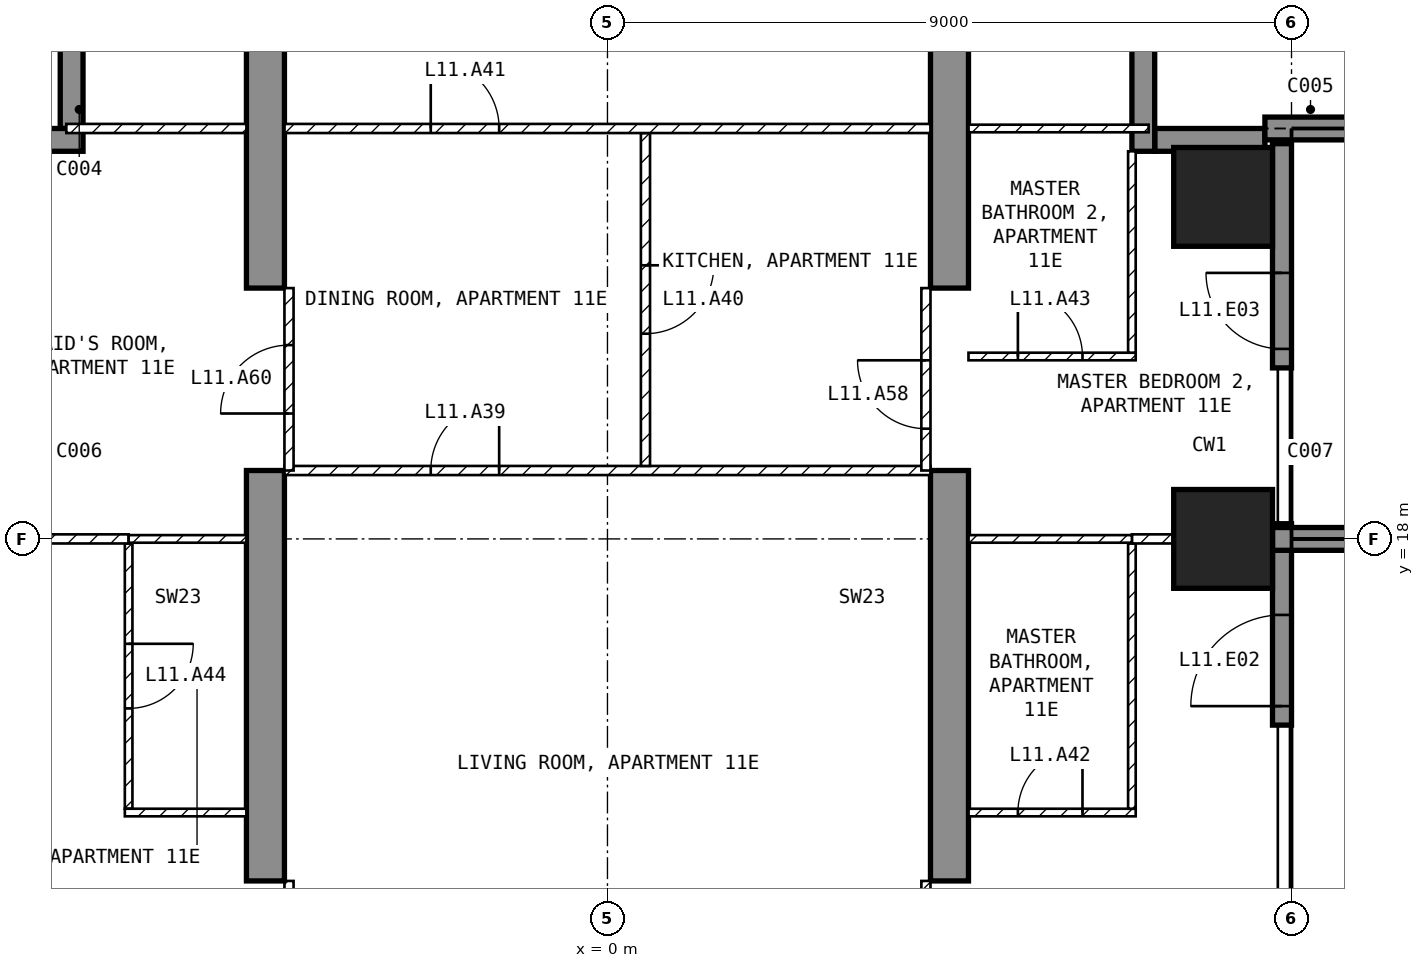
"""IFC4 building model, lengths in metres.
Left out: names, types, materials, properties, quantities, classifications, styles, units other than length and angle.
Written with IfcOpenShell. Run it as: python <this file> out.ifc"""

import sys

from ifc_helpers import new_model, si_unit, direction, frame, frame_2d, origin, origin_2d, place, context, subcontext, project, spatial, polyline, rectangle, outline, extrude, element, fill, save


model = new_model("IFC4")
c1 = context("Model", 3, precision=1e-05, world=origin(), true_north=direction((0.0, 1.0)))
c2 = subcontext(c1, "Body", "Model", "MODEL_VIEW")
j1 = project(units=[si_unit("LENGTHUNIT", "METRE"), si_unit("PLANEANGLEUNIT", "RADIAN")], contexts=[c1])
p1 = place(None, origin())
s1 = spatial("IfcSite", under=j1, at=p1, CompositionType="ELEMENT")
p2 = place(p1, origin())
s2 = spatial("IfcBuilding", under=s1, at=p2, CompositionType="ELEMENT")
p3 = place(p2, frame((0.0, 0.0, 57.5)))
s3 = spatial("IfcBuildingStorey", under=s2, at=p3, CompositionType="ELEMENT", Elevation=57.5)
for number, where, z_axis, x_axis in (
    (1, (8.1, 18.0, -0.25), (0.0, 0.0, 1.0), (1.0, 0.0, 0.0)),
    (2, (8.1, 22.5, -0.25), (0.0, 0.0, 1.0), (1.0, 0.0, 0.0)),
):
    element("IfcColumn", number, at=place(p3, frame(where, z_axis=z_axis, x_axis=x_axis)), inside=s3, PredefinedType="COLUMN", context=c2, shape_type="SweptSolid", body=[
        extrude(rectangle(XDim=1.3, YDim=1.3, at=origin_2d()), origin(), (0.0, 0.0, 1.0), 3.5),
    ])
for number, where, z_axis, x_axis in (
    (3, (-4.75, 9.0, -0.25), (1.0, 0.0, 0.0), (0.0, 1.0, 0.0)),
    (4, (4.25, 9.0, -0.25), (1.0, 0.0, 0.0), (0.0, 1.0, 0.0)),
):
    element("IfcWall", number, at=place(p3, frame(where, z_axis=z_axis, x_axis=x_axis)), inside=s3, PredefinedType="SHEAR", context=c2, shape_type="SweptSolid", body=[
        extrude(outline(polyline([(0.0, 0.0), (2.1, 0.0), (2.1, 2.65), (4.5, 2.65), (4.5, 0.0), (9.9, 0.0), (9.9, 2.65), (12.3, 2.65), (12.3, 0.0), (16.45, 0.0), (16.45, 3.5), (0.0, 3.5), (0.0, 0.0)])), origin(), (0.0, 0.0, 1.0), 0.5),
    ])
p4 = place(p3, frame((8.875, 15.55, 0.0), z_axis=(0.0, 0.0, 1.0), x_axis=(0.0, 1.0, 0.0)))
e5 = element("IfcWall", 5, at=p4, inside=s3, PredefinedType="SOLIDWALL", context=c2, shape_type="SweptSolid", body=[
    extrude(rectangle(XDim=2.65, YDim=0.25, at=frame_2d((1.325, 0.0))), origin(), (0.0, 0.0, 1.0), 3.25),
])
p5 = place(p4, frame((0.25, 0.0, 0.0)))
e6 = element("IfcOpeningElement", 6, at=p5, cuts=e5, PredefinedType="OPENING", context=c2, shape_type="SweptSolid", body=[
    extrude(rectangle(XDim=1.2, YDim=2.4, at=frame_2d((0.6, 1.2))), frame((0.0, 0.135, 0.0), z_axis=(0.0, -1.0, 0.0), x_axis=(1.0, 0.0, 0.0)), (0.0, 0.0, 1.0), 0.27),
])
p6 = place(p3, frame((8.875, 20.25, 0.0), z_axis=(0.0, 0.0, 1.0), x_axis=(0.0, 1.0, 0.0)))
e7 = element("IfcWall", 7, at=p6, inside=s3, PredefinedType="SOLIDWALL", context=c2, shape_type="SweptSolid", body=[
    extrude(rectangle(XDim=2.95, YDim=0.25, at=frame_2d((1.475, 0.0))), origin(), (0.0, 0.0, 1.0), 3.25),
])
p7 = place(p6, frame((0.25, 0.0, 0.0)))
e8 = element("IfcOpeningElement", 8, at=p7, cuts=e7, PredefinedType="OPENING", context=c2, shape_type="SweptSolid", body=[
    extrude(rectangle(XDim=1.0, YDim=2.4, at=frame_2d((0.5, 1.2))), frame((0.0, 0.135, 0.0), z_axis=(0.0, -1.0, 0.0), x_axis=(1.0, 0.0, 0.0)), (0.0, 0.0, 1.0), 0.27),
])
p8 = place(p3, frame((8.65, 23.25, 0.0), z_axis=(0.0, 0.0, 1.0), x_axis=(-1.0, 0.0, 0.0)))
e9 = element("IfcWall", 9, at=p8, inside=s3, PredefinedType="SOLIDWALL", context=c2, shape_type="SweptSolid", body=[
    extrude(rectangle(XDim=1.45, YDim=0.3, at=frame_2d((0.725, 0.0))), origin(), (0.0, 0.0, 1.0), 3.25),
])
p9 = place(p3, frame((7.05, 23.1, 0.0), z_axis=(0.0, 0.0, 1.0), x_axis=(0.0, 1.0, 0.0)))
e10 = element("IfcWall", 10, at=p9, inside=s3, PredefinedType="SOLIDWALL", context=c2, shape_type="SweptSolid", body=[
    extrude(rectangle(XDim=1.8, YDim=0.3, at=frame_2d((0.9, 0.0))), origin(), (0.0, 0.0, 1.0), 3.25),
])
p10 = place(p3, frame((-7.05, 25.2, 0.0), z_axis=(0.0, 0.0, 1.0), x_axis=(0.0, -1.0, 0.0)))
e11 = element("IfcWall", 11, at=p10, inside=s3, PredefinedType="SOLIDWALL", context=c2, shape_type="SweptSolid", body=[
    extrude(rectangle(XDim=1.8, YDim=0.3, at=frame_2d((0.9, 0.0))), origin(), (0.0, 0.0, 1.0), 3.25),
])
p11 = place(p3, frame((-6.9, 23.25, 0.0), z_axis=(0.0, 0.0, 1.0), x_axis=(-1.0, 0.0, 0.0)))
e12 = element("IfcWall", 12, at=p11, inside=s3, PredefinedType="SOLIDWALL", context=c2, shape_type="SweptSolid", body=[
    extrude(rectangle(XDim=1.75, YDim=0.3, at=frame_2d((0.875, 0.0))), origin(), (0.0, 0.0, 1.0), 3.25),
])
p12 = place(p3, frame((8.75, 18.0, 0.0), z_axis=(0.0, 0.0, 1.0), x_axis=(1.0, 0.0, 0.0)))
e13 = element("IfcWall", 13, at=p12, inside=s3, PredefinedType="SOLIDWALL", context=c2, shape_type="SweptSolid", body=[
    extrude(rectangle(XDim=2.95, YDim=0.3, at=frame_2d((1.475, 0.0))), origin(), (0.0, 0.0, 1.0), 3.25),
])
p13 = place(p3, frame((8.65, 23.4, 0.0), z_axis=(0.0, 0.0, 1.0), x_axis=(1.0, 0.0, 0.0)))
e14 = element("IfcWall", 14, at=p13, inside=s3, PredefinedType="SOLIDWALL", context=c2, shape_type="SweptSolid", body=[
    extrude(rectangle(XDim=3.05, YDim=0.3, at=frame_2d((1.525, 0.0))), origin(), (0.0, 0.0, 1.0), 3.25),
])
p14 = place(p3, frame((-4.25, 18.9, 0.0), z_axis=(0.0, 0.0, 1.0), x_axis=(1.0, 0.0, 0.0)))
e15 = element("IfcWall", 15, at=p14, inside=s3, PredefinedType="PARTITIONING", context=c2, shape_type="SweptSolid", body=[
    extrude(rectangle(XDim=8.5, YDim=0.12, at=frame_2d((4.25, 0.0))), origin(), (0.0, 0.0, 1.0), 3.25),
])
p15 = place(p14, frame((1.925, 0.0, 0.0)))
e16 = element("IfcOpeningElement", 16, at=p15, cuts=e15, PredefinedType="OPENING", context=c2, shape_type="SweptSolid", body=[
    extrude(rectangle(XDim=0.9, YDim=2.1, at=frame_2d((0.45, 1.05))), frame((0.0, 0.07, 0.0), z_axis=(0.0, -1.0, 0.0), x_axis=(1.0, 0.0, 0.0)), (0.0, 0.0, 1.0), 0.14),
])
p16 = place(p3, frame((0.5, 23.34, 0.0), z_axis=(0.0, 0.0, 1.0), x_axis=(0.0, -1.0, 0.0)))
e17 = element("IfcWall", 17, at=p16, inside=s3, PredefinedType="PARTITIONING", context=c2, shape_type="SweptSolid", body=[
    extrude(rectangle(XDim=4.38, YDim=0.12, at=frame_2d((2.19, 0.0))), origin(), (0.0, 0.0, 1.0), 3.25),
])
p17 = place(p16, frame((1.74, 0.0, 0.0)))
e18 = element("IfcOpeningElement", 18, at=p17, cuts=e17, PredefinedType="OPENING", context=c2, shape_type="SweptSolid", body=[
    extrude(rectangle(XDim=0.9, YDim=2.1, at=frame_2d((0.45, 1.05))), frame((0.0, 0.07, 0.0), z_axis=(0.0, -1.0, 0.0), x_axis=(1.0, 0.0, 0.0)), (0.0, 0.0, 1.0), 0.14),
])
p18 = place(p3, frame((-4.25, 23.4, 0.0), z_axis=(0.0, 0.0, 1.0), x_axis=(1.0, 0.0, 0.0)))
e19 = element("IfcWall", 19, at=p18, inside=s3, PredefinedType="PARTITIONING", context=c2, shape_type="SweptSolid", body=[
    extrude(rectangle(XDim=8.5, YDim=0.12, at=frame_2d((4.25, 0.0))), origin(), (0.0, 0.0, 1.0), 3.25),
])
p19 = place(p18, frame((1.925, 0.0, 0.0)))
e20 = element("IfcOpeningElement", 20, at=p19, cuts=e19, PredefinedType="OPENING", context=c2, shape_type="SweptSolid", body=[
    extrude(rectangle(XDim=0.9, YDim=2.1, at=frame_2d((0.45, 1.05))), frame((0.0, 0.07, 0.0), z_axis=(0.0, -1.0, 0.0), x_axis=(1.0, 0.0, 0.0)), (0.0, 0.0, 1.0), 0.14),
])
p20 = place(p3, frame((4.75, 14.4, 0.0), z_axis=(0.0, 0.0, 1.0), x_axis=(1.0, 0.0, 0.0)))
e21 = element("IfcWall", 21, at=p20, inside=s3, PredefinedType="PARTITIONING", context=c2, shape_type="SweptSolid", body=[
    extrude(rectangle(XDim=2.2, YDim=0.1, at=frame_2d((1.1, 0.0))), origin(), (0.0, 0.0, 1.0), 3.25),
])
p21 = place(p20, frame((0.65, 0.0, 0.0)))
e22 = element("IfcOpeningElement", 22, at=p21, cuts=e21, PredefinedType="OPENING", context=c2, shape_type="SweptSolid", body=[
    extrude(rectangle(XDim=0.85, YDim=2.1, at=frame_2d((0.425, 1.05))), frame((0.0, 0.06, 0.0), z_axis=(0.0, -1.0, 0.0), x_axis=(1.0, 0.0, 0.0)), (0.0, 0.0, 1.0), 0.12),
])
p22 = place(p3, frame((6.9, 14.45, 0.0), z_axis=(0.0, 0.0, 1.0), x_axis=(0.0, 1.0, 0.0)))
e23 = element("IfcWall", 23, at=p22, inside=s3, PredefinedType="PARTITIONING", context=c2, shape_type="SweptSolid", body=[
    extrude(rectangle(XDim=3.49, YDim=0.1, at=frame_2d((1.745, 0.0))), origin(), (0.0, 0.0, 1.0), 3.25),
])
p23 = place(p3, frame((6.9, 18.0, 0.0), z_axis=(0.0, 0.0, 1.0), x_axis=(1.0, 0.0, 0.0)))
e24 = element("IfcWall", 24, at=p23, inside=s3, PredefinedType="PARTITIONING", context=c2, shape_type="SweptSolid", body=[
    extrude(rectangle(XDim=0.55, YDim=0.12, at=frame_2d((0.275, 0.0))), origin(), (0.0, 0.0, 1.0), 2.346),
])
p24 = place(p3, frame((4.75, 18.0, 0.0), z_axis=(0.0, 0.0, 1.0), x_axis=(1.0, 0.0, 0.0)))
e25 = element("IfcWall", 25, at=p24, inside=s3, PredefinedType="PARTITIONING", context=c2, shape_type="SweptSolid", body=[
    extrude(rectangle(XDim=2.15, YDim=0.1, at=frame_2d((1.075, 0.0))), origin(), (0.0, 0.0, 1.0), 2.346),
])
p25 = place(p3, frame((4.75, 20.4, 0.0), z_axis=(0.0, 0.0, 1.0), x_axis=(1.0, 0.0, 0.0)))
e26 = element("IfcWall", 26, at=p25, inside=s3, PredefinedType="PARTITIONING", context=c2, shape_type="SweptSolid", body=[
    extrude(rectangle(XDim=2.2, YDim=0.1, at=frame_2d((1.1, 0.0))), origin(), (0.0, 0.0, 1.0), 3.25),
])
p26 = place(p25, frame((0.65, 0.0, 0.0)))
e27 = element("IfcOpeningElement", 27, at=p26, cuts=e26, PredefinedType="OPENING", context=c2, shape_type="SweptSolid", body=[
    extrude(rectangle(XDim=0.85, YDim=2.1, at=frame_2d((0.425, 1.05))), frame((0.0, 0.06, 0.0), z_axis=(0.0, -1.0, 0.0), x_axis=(1.0, 0.0, 0.0)), (0.0, 0.0, 1.0), 0.12),
])
p27 = place(p3, frame((6.9, 20.45, 0.0), z_axis=(0.0, 0.0, 1.0), x_axis=(0.0, 1.0, 0.0)))
e28 = element("IfcWall", 28, at=p27, inside=s3, PredefinedType="PARTITIONING", context=c2, shape_type="SweptSolid", body=[
    extrude(rectangle(XDim=2.65, YDim=0.1, at=frame_2d((1.325, 0.0))), origin(), (0.0, 0.0, 1.0), 3.25),
])
p28 = place(p3, frame((4.75, 23.4, 0.0), z_axis=(0.0, 0.0, 1.0), x_axis=(1.0, 0.0, 0.0)))
e29 = element("IfcWall", 29, at=p28, inside=s3, PredefinedType="PARTITIONING", context=c2, shape_type="SweptSolid", body=[
    extrude(rectangle(XDim=2.37, YDim=0.1, at=frame_2d((1.185, 0.0))), origin(), (0.0, 0.0, 1.0), 3.25),
])
p29 = place(p3, frame((-6.3, 17.94, 0.0), z_axis=(0.0, 0.0, 1.0), x_axis=(0.0, -1.0, 0.0)))
e30 = element("IfcWall", 30, at=p29, inside=s3, PredefinedType="PARTITIONING", context=c2, shape_type="SweptSolid", body=[
    extrude(rectangle(XDim=3.49, YDim=0.1, at=frame_2d((1.745, 0.0))), origin(), (0.0, 0.0, 1.0), 3.25),
])
p30 = place(p29, frame((1.32, 0.0, 0.0)))
e31 = element("IfcOpeningElement", 31, at=p30, cuts=e30, PredefinedType="OPENING", context=c2, shape_type="SweptSolid", body=[
    extrude(rectangle(XDim=0.85, YDim=2.1, at=frame_2d((0.425, 1.05))), frame((0.0, 0.06, 0.0), z_axis=(0.0, -1.0, 0.0), x_axis=(1.0, 0.0, 0.0)), (0.0, 0.0, 1.0), 0.12),
])
p31 = place(p3, frame((-6.35, 14.4, 0.0), z_axis=(0.0, 0.0, 1.0), x_axis=(1.0, 0.0, 0.0)))
e32 = element("IfcWall", 32, at=p31, inside=s3, PredefinedType="PARTITIONING", context=c2, shape_type="SweptSolid", body=[
    extrude(rectangle(XDim=1.6, YDim=0.1, at=frame_2d((0.8, 0.0))), origin(), (0.0, 0.0, 1.0), 3.25),
])
p32 = place(p3, frame((-7.45, 18.0, 0.0), z_axis=(0.0, 0.0, 1.0), x_axis=(1.0, 0.0, 0.0)))
e33 = element("IfcWall", 33, at=p32, inside=s3, PredefinedType="PARTITIONING", context=c2, shape_type="SweptSolid", body=[
    extrude(rectangle(XDim=1.15, YDim=0.12, at=frame_2d((0.575, 0.0))), origin(), (0.0, 0.0, 1.0), 2.346),
])
p33 = place(p3, frame((-6.3, 18.0, 0.0), z_axis=(0.0, 0.0, 1.0), x_axis=(1.0, 0.0, 0.0)))
e34 = element("IfcWall", 34, at=p33, inside=s3, PredefinedType="PARTITIONING", context=c2, shape_type="SweptSolid", body=[
    extrude(rectangle(XDim=1.55, YDim=0.1, at=frame_2d((0.775, 0.0))), origin(), (0.0, 0.0, 1.0), 2.346),
])
p34 = place(p3, frame((-7.12, 23.4, 0.0), z_axis=(0.0, 0.0, 1.0), x_axis=(1.0, 0.0, 0.0)))
e35 = element("IfcWall", 35, at=p34, inside=s3, PredefinedType="PARTITIONING", context=c2, shape_type="SweptSolid", body=[
    extrude(rectangle(XDim=2.37, YDim=0.12, at=frame_2d((1.185, 0.0))), origin(), (0.0, 0.0, 1.0), 3.25),
])
p35 = place(p3, frame((4.19, 11.1, 0.0), z_axis=(0.0, 0.0, 1.0), x_axis=(0.0, 1.0, 0.0)))
e36 = element("IfcWall", 36, at=p35, inside=s3, PredefinedType="PARTITIONING", context=c2, shape_type="SweptSolid", body=[
    extrude(rectangle(XDim=2.4, YDim=0.12, at=frame_2d((1.2, 0.0))), origin(), (0.0, 0.0, 1.0), 2.4),
])
p36 = place(p35, frame((0.75, 0.0, 0.0)))
e37 = element("IfcOpeningElement", 37, at=p36, cuts=e36, PredefinedType="OPENING", context=c2, shape_type="SweptSolid", body=[
    extrude(rectangle(XDim=0.9, YDim=2.1, at=frame_2d((0.45, 1.05))), frame((0.0, 0.07, 0.0), z_axis=(0.0, -1.0, 0.0), x_axis=(1.0, 0.0, 0.0)), (0.0, 0.0, 1.0), 0.14),
])
p37 = place(p3, frame((4.19, 18.9, 0.0), z_axis=(0.0, 0.0, 1.0), x_axis=(0.0, 1.0, 0.0)))
e38 = element("IfcWall", 38, at=p37, inside=s3, PredefinedType="PARTITIONING", context=c2, shape_type="SweptSolid", body=[
    extrude(rectangle(XDim=2.4, YDim=0.12, at=frame_2d((1.2, 0.0))), origin(), (0.0, 0.0, 1.0), 2.4),
])
p38 = place(p37, frame((0.55, 0.0, 0.0)))
e39 = element("IfcOpeningElement", 39, at=p38, cuts=e38, PredefinedType="OPENING", context=c2, shape_type="SweptSolid", body=[
    extrude(rectangle(XDim=0.9, YDim=2.1, at=frame_2d((0.45, 1.05))), frame((0.0, 0.07, 0.0), z_axis=(0.0, -1.0, 0.0), x_axis=(1.0, 0.0, 0.0)), (0.0, 0.0, 1.0), 0.14),
])
p39 = place(p3, frame((-4.19, 11.1, 0.0), z_axis=(0.0, 0.0, 1.0), x_axis=(0.0, 1.0, 0.0)))
e40 = element("IfcWall", 40, at=p39, inside=s3, PredefinedType="PARTITIONING", context=c2, shape_type="SweptSolid", body=[
    extrude(rectangle(XDim=2.4, YDim=0.12, at=frame_2d((1.2, 0.0))), origin(), (0.0, 0.0, 1.0), 2.4),
])
p40 = place(p39, frame((0.75, 0.0, 0.0)))
e41 = element("IfcOpeningElement", 41, at=p40, cuts=e40, PredefinedType="OPENING", context=c2, shape_type="SweptSolid", body=[
    extrude(rectangle(XDim=0.9, YDim=2.1, at=frame_2d((0.45, 1.05))), frame((0.0, 0.07, 0.0), z_axis=(0.0, -1.0, 0.0), x_axis=(1.0, 0.0, 0.0)), (0.0, 0.0, 1.0), 0.14),
])
p41 = place(p3, frame((-4.19, 18.9, 0.0), z_axis=(0.0, 0.0, 1.0), x_axis=(0.0, 1.0, 0.0)))
e42 = element("IfcWall", 42, at=p41, inside=s3, PredefinedType="PARTITIONING", context=c2, shape_type="SweptSolid", body=[
    extrude(rectangle(XDim=2.4, YDim=0.12, at=frame_2d((1.2, 0.0))), origin(), (0.0, 0.0, 1.0), 2.4),
])
p42 = place(p41, frame((0.75, 0.0, 0.0)))
e43 = element("IfcOpeningElement", 43, at=p42, cuts=e42, PredefinedType="OPENING", context=c2, shape_type="SweptSolid", body=[
    extrude(rectangle(XDim=0.9, YDim=2.1, at=frame_2d((0.45, 1.05))), frame((0.0, 0.07, 0.0), z_axis=(0.0, -1.0, 0.0), x_axis=(1.0, 0.0, 0.0)), (0.0, 0.0, 1.0), 0.14),
])
p43 = place(p5, origin())
e44 = element("IfcDoor", 44, at=p43, inside=s3, OperationType="SINGLE_SWING_LEFT", PredefinedType="DOOR", context=c2, shape_type="SweptSolid", body=[
    extrude(rectangle(XDim=1.2, YDim=2.4, at=frame_2d((0.6, 1.2))), frame((0.0, 0.025, 0.0), z_axis=(0.0, -1.0, 0.0), x_axis=(1.0, 0.0, 0.0)), (0.0, 0.0, 1.0), 0.05),
])
fill(e6, e44)
p44 = place(p7, origin())
e45 = element("IfcDoor", 45, at=p44, inside=s3, OperationType="SINGLE_SWING_RIGHT", PredefinedType="DOOR", context=c2, shape_type="SweptSolid", body=[
    extrude(rectangle(XDim=1.0, YDim=2.4, at=frame_2d((0.5, 1.2))), frame((0.0, 0.025, 0.0), z_axis=(0.0, -1.0, 0.0), x_axis=(1.0, 0.0, 0.0)), (0.0, 0.0, 1.0), 0.05),
])
fill(e8, e45)
p45 = place(p15, origin())
e46 = element("IfcDoor", 46, at=p45, inside=s3, OperationType="SINGLE_SWING_RIGHT", PredefinedType="DOOR", context=c2, shape_type="SweptSolid", body=[
    extrude(rectangle(XDim=0.9, YDim=2.1, at=frame_2d((0.45, 1.05))), frame((0.0, 0.025, 0.0), z_axis=(0.0, -1.0, 0.0), x_axis=(1.0, 0.0, 0.0)), (0.0, 0.0, 1.0), 0.05),
])
fill(e16, e46)
p46 = place(p17, origin())
e47 = element("IfcDoor", 47, at=p46, inside=s3, OperationType="SINGLE_SWING_LEFT", PredefinedType="DOOR", context=c2, shape_type="SweptSolid", body=[
    extrude(rectangle(XDim=0.9, YDim=2.1, at=frame_2d((0.45, 1.05))), frame((0.0, 0.025, 0.0), z_axis=(0.0, -1.0, 0.0), x_axis=(1.0, 0.0, 0.0)), (0.0, 0.0, 1.0), 0.05),
])
fill(e18, e47)
p47 = place(p19, origin())
e48 = element("IfcDoor", 48, at=p47, inside=s3, OperationType="SINGLE_SWING_LEFT", PredefinedType="DOOR", context=c2, shape_type="SweptSolid", body=[
    extrude(rectangle(XDim=0.9, YDim=2.1, at=frame_2d((0.45, 1.05))), frame((0.0, 0.025, 0.0), z_axis=(0.0, -1.0, 0.0), x_axis=(1.0, 0.0, 0.0)), (0.0, 0.0, 1.0), 0.05),
])
fill(e20, e48)
p48 = place(p21, origin())
e49 = element("IfcDoor", 49, at=p48, inside=s3, OperationType="SINGLE_SWING_RIGHT", PredefinedType="DOOR", context=c2, shape_type="SweptSolid", body=[
    extrude(rectangle(XDim=0.85, YDim=2.1, at=frame_2d((0.425, 1.05))), frame((0.0, 0.025, 0.0), z_axis=(0.0, -1.0, 0.0), x_axis=(1.0, 0.0, 0.0)), (0.0, 0.0, 1.0), 0.05),
])
fill(e22, e49)
p49 = place(p26, origin())
e50 = element("IfcDoor", 50, at=p49, inside=s3, OperationType="SINGLE_SWING_LEFT", PredefinedType="DOOR", context=c2, shape_type="SweptSolid", body=[
    extrude(rectangle(XDim=0.85, YDim=2.1, at=frame_2d((0.425, 1.05))), frame((0.0, 0.025, 0.0), z_axis=(0.0, -1.0, 0.0), x_axis=(1.0, 0.0, 0.0)), (0.0, 0.0, 1.0), 0.05),
])
fill(e27, e50)
p50 = place(p30, origin())
e51 = element("IfcDoor", 51, at=p50, inside=s3, OperationType="SINGLE_SWING_LEFT", PredefinedType="DOOR", context=c2, shape_type="SweptSolid", body=[
    extrude(rectangle(XDim=0.85, YDim=2.1, at=frame_2d((0.425, 1.05))), frame((0.0, 0.025, 0.0), z_axis=(0.0, -1.0, 0.0), x_axis=(1.0, 0.0, 0.0)), (0.0, 0.0, 1.0), 0.05),
])
fill(e31, e51)
p51 = place(p38, origin())
e52 = element("IfcDoor", 52, at=p51, inside=s3, OperationType="SINGLE_SWING_RIGHT", PredefinedType="DOOR", context=c2, shape_type="SweptSolid", body=[
    extrude(rectangle(XDim=0.9, YDim=2.1, at=frame_2d((0.45, 1.05))), frame((0.0, 0.025, 0.0), z_axis=(0.0, -1.0, 0.0), x_axis=(1.0, 0.0, 0.0)), (0.0, 0.0, 1.0), 0.05),
])
fill(e39, e52)
p52 = place(p42, origin())
e53 = element("IfcDoor", 53, at=p52, inside=s3, OperationType="SINGLE_SWING_LEFT", PredefinedType="DOOR", context=c2, shape_type="SweptSolid", body=[
    extrude(rectangle(XDim=0.9, YDim=2.1, at=frame_2d((0.45, 1.05))), frame((0.0, 0.025, 0.0), z_axis=(0.0, -1.0, 0.0), x_axis=(1.0, 0.0, 0.0)), (0.0, 0.0, 1.0), 0.05),
])
fill(e43, e53)
save(model, sys.argv[1])
